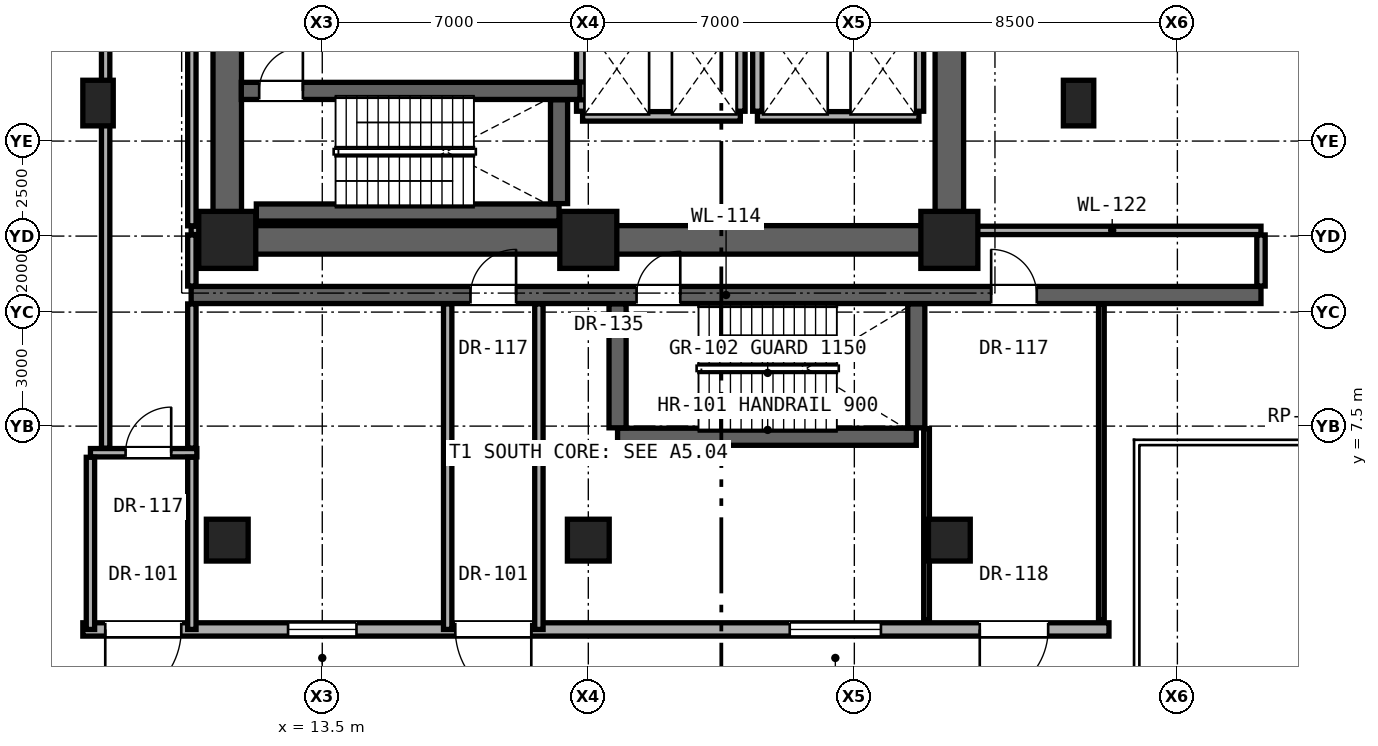
"""IFC4 building model, lengths in metres.
Left out: names, types, materials, properties, quantities, classifications, styles, units other than length and angle.
Written with IfcOpenShell. Run it as: python <this file> out.ifc"""

import sys

from ifc_helpers import new_model, si_unit, direction, frame, frame_2d, origin, origin_2d, place, context, subcontext, project, spatial, rectangle, extrude, element, fill, save


model = new_model("IFC4")
c1 = context("Model", 3, precision=1e-05, world=origin(), true_north=direction((0.0, 1.0)))
c2 = subcontext(c1, "Body", "Model", "MODEL_VIEW")
j1 = project(units=[si_unit("LENGTHUNIT", "METRE"), si_unit("PLANEANGLEUNIT", "RADIAN")], contexts=[c1])
p1 = place(None, origin())
s1 = spatial("IfcSite", under=j1, at=p1, CompositionType="ELEMENT")
p2 = place(p1, origin())
s2 = spatial("IfcBuilding", under=s1, at=p2, CompositionType="ELEMENT")
p3 = place(p2, origin())
s3 = spatial("IfcBuildingStorey", under=s2, at=p3, CompositionType="ELEMENT", Elevation=0.0)
for number, where, z_axis, x_axis in (
    (1, (11.0, 12.4, 0.0), (0.0, 0.0, 1.0), (1.0, 0.0, 0.0)),
    (2, (20.5, 12.4, 0.0), (0.0, 0.0, 1.0), (1.0, 0.0, 0.0)),
    (3, (30.0, 12.4, 0.0), (0.0, 0.0, 1.0), (1.0, 0.0, 0.0)),
):
    element("IfcColumn", number, at=place(p3, frame(where, z_axis=z_axis, x_axis=x_axis)), inside=s3, PredefinedType="COLUMN", context=c2, shape_type="SweptSolid", body=[
        extrude(rectangle(XDim=1.5, YDim=1.5, at=origin_2d()), origin(), (0.0, 0.0, 1.0), 5.2),
    ])
for number, where, z_axis, x_axis in (
    (4, (7.6, 16.0, 0.0), (0.0, 0.0, 1.0), (1.0, 0.0, 0.0)),
    (5, (33.4, 16.0, 0.0), (0.0, 0.0, 1.0), (1.0, 0.0, 0.0)),
):
    element("IfcColumn", number, at=place(p3, frame(where, z_axis=z_axis, x_axis=x_axis)), inside=s3, PredefinedType="PILASTER", context=c2, shape_type="SweptSolid", body=[
        extrude(rectangle(XDim=0.8, YDim=1.2, at=origin_2d()), origin(), (0.0, 0.0, 1.0), 5.2),
    ])
p4 = place(p3, frame((11.0, 12.4, 0.0), z_axis=(0.0, 0.0, 1.0), x_axis=(1.0, 0.0, 0.0)))
e6 = element("IfcWall", 6, at=p4, inside=s3, PredefinedType="SHEAR", context=c2, shape_type="SweptSolid", body=[
    extrude(rectangle(XDim=19.0, YDim=0.75, at=frame_2d((9.5, 0.0))), origin(), (0.0, 0.0, 1.0), 4.88),
])
for number, where, z_axis, x_axis in (
    (7, (11.0, 12.4, 0.0), (0.0, 0.0, 1.0), (0.0, 1.0, 0.0)),
    (8, (30.0, 12.4, 0.0), (0.0, 0.0, 1.0), (0.0, 1.0, 0.0)),
):
    element("IfcWall", number, at=place(p3, frame(where, z_axis=z_axis, x_axis=x_axis)), inside=s3, PredefinedType="SHEAR", context=c2, shape_type="SweptSolid", body=[
        extrude(rectangle(XDim=6.0, YDim=0.75, at=frame_2d((3.0, 0.0))), origin(), (0.0, 0.0, 1.0), 4.88),
    ])
for number, where, z_axis, x_axis in (
    (9, (11.0, 4.5, 0.0), (0.0, 0.0, 1.0), (1.0, 0.0, 0.0)),
    (10, (20.5, 4.5, 0.0), (0.0, 0.0, 1.0), (1.0, 0.0, 0.0)),
    (11, (30.0, 4.5, 0.0), (0.0, 0.0, 1.0), (1.0, 0.0, 0.0)),
):
    element("IfcColumn", number, at=place(p3, frame(where, z_axis=z_axis, x_axis=x_axis)), inside=s3, PredefinedType="COLUMN", context=c2, shape_type="SweptSolid", body=[
        extrude(rectangle(XDim=1.1, YDim=1.1, at=origin_2d()), origin(), (0.0, 0.0, 1.0), 5.2),
    ])
p5 = place(p3, frame((34.2, 2.15, 0.0), z_axis=(0.0, 0.0, 1.0), x_axis=(-1.0, 0.0, 0.0)))
e12 = element("IfcWall", 12, at=p5, inside=s3, PredefinedType="SOLIDWALL", context=c2, shape_type="SweptSolid", body=[
    extrude(rectangle(XDim=27.0, YDim=0.35, at=frame_2d((13.5, 0.0))), origin(), (0.0, 0.0, 1.0), 4.86),
])
p6 = place(p5, frame((6.0, 0.0, 0.85)))
e13 = element("IfcOpeningElement", 13, at=p6, cuts=e12, PredefinedType="OPENING", context=c2, shape_type="SweptSolid", body=[
    extrude(rectangle(XDim=2.4, YDim=2.6, at=frame_2d((1.2, 1.3))), frame((0.0, 0.185, 0.0), z_axis=(0.0, -1.0, 0.0), x_axis=(1.0, 0.0, 0.0)), (0.0, 0.0, 1.0), 0.37),
])
p7 = place(p5, frame((19.8, 0.0, 0.85)))
e14 = element("IfcOpeningElement", 14, at=p7, cuts=e12, PredefinedType="OPENING", context=c2, shape_type="SweptSolid", body=[
    extrude(rectangle(XDim=1.8, YDim=2.4, at=frame_2d((0.9, 1.2))), frame((0.0, 0.185, 0.0), z_axis=(0.0, -1.0, 0.0), x_axis=(1.0, 0.0, 0.0)), (0.0, 0.0, 1.0), 0.37),
])
p8 = place(p5, frame((1.6, 0.0, 0.0)))
e15 = element("IfcOpeningElement", 15, at=p8, cuts=e12, PredefinedType="OPENING", context=c2, shape_type="SweptSolid", body=[
    extrude(rectangle(XDim=1.8, YDim=2.5, at=frame_2d((0.9, 1.25))), frame((0.0, 0.185, 0.0), z_axis=(0.0, -1.0, 0.0), x_axis=(1.0, 0.0, 0.0)), (0.0, 0.0, 1.0), 0.37),
])
p9 = place(p5, frame((15.2, 0.0, 0.0)))
e16 = element("IfcOpeningElement", 16, at=p9, cuts=e12, PredefinedType="OPENING", context=c2, shape_type="SweptSolid", body=[
    extrude(rectangle(XDim=2.0, YDim=2.4, at=frame_2d((1.0, 1.2))), frame((0.0, 0.185, 0.0), z_axis=(0.0, -1.0, 0.0), x_axis=(1.0, 0.0, 0.0)), (0.0, 0.0, 1.0), 0.37),
])
p10 = place(p5, frame((24.41, 0.0, 0.0)))
e17 = element("IfcOpeningElement", 17, at=p10, cuts=e12, PredefinedType="OPENING", context=c2, shape_type="SweptSolid", body=[
    extrude(rectangle(XDim=2.0, YDim=2.4, at=frame_2d((1.0, 1.2))), frame((0.0, 0.185, 0.0), z_axis=(0.0, -1.0, 0.0), x_axis=(1.0, 0.0, 0.0)), (0.0, 0.0, 1.0), 0.37),
])
p11 = place(p3, frame((7.4, 6.8, 0.0), z_axis=(0.0, 0.0, 1.0), x_axis=(1.0, 0.0, 0.0)))
e18 = element("IfcWall", 18, at=p11, inside=s3, PredefinedType="SOLIDWALL", context=c2, shape_type="SweptSolid", body=[
    extrude(rectangle(XDim=2.8, YDim=0.22, at=frame_2d((1.4, 0.0))), origin(), (0.0, 0.0, 1.0), 4.88),
])
p12 = place(p11, frame((0.925, 0.0, 0.0)))
e19 = element("IfcOpeningElement", 19, at=p12, cuts=e18, PredefinedType="OPENING", context=c2, shape_type="SweptSolid", body=[
    extrude(rectangle(XDim=1.2, YDim=2.25, at=frame_2d((0.6, 1.125))), frame((0.0, 0.12, 0.0), z_axis=(0.0, -1.0, 0.0), x_axis=(1.0, 0.0, 0.0)), (0.0, 0.0, 1.0), 0.24),
])
p13 = place(p3, frame((21.27, 7.22, 0.0), z_axis=(0.0, 0.0, 1.0), x_axis=(1.0, 0.0, 0.0)))
e20 = element("IfcWall", 20, at=p13, inside=s3, PredefinedType="SHEAR", context=c2, shape_type="SweptSolid", body=[
    extrude(rectangle(XDim=7.86, YDim=0.45, at=frame_2d((3.93, 0.0))), origin(), (0.0, 0.0, 1.0), 4.88),
])
p14 = place(p3, frame((10.05, 10.95, 0.0), z_axis=(0.0, 0.0, 1.0), x_axis=(1.0, 0.0, 0.0)))
e21 = element("IfcWall", 21, at=p14, inside=s3, PredefinedType="SHEAR", context=c2, shape_type="SweptSolid", body=[
    extrude(rectangle(XDim=28.15, YDim=0.45, at=frame_2d((14.075, 0.0))), origin(), (0.0, 0.0, 1.0), 4.88),
])
p15 = place(p14, frame((7.35, 0.0, 0.0)))
e22 = element("IfcOpeningElement", 22, at=p15, cuts=e21, PredefinedType="OPENING", context=c2, shape_type="SweptSolid", body=[
    extrude(rectangle(XDim=1.2, YDim=2.25, at=frame_2d((0.6, 1.125))), frame((0.0, 0.235, 0.0), z_axis=(0.0, -1.0, 0.0), x_axis=(1.0, 0.0, 0.0)), (0.0, 0.0, 1.0), 0.47),
])
p16 = place(p14, frame((11.72, 0.0, 0.0)))
e23 = element("IfcOpeningElement", 23, at=p16, cuts=e21, PredefinedType="OPENING", context=c2, shape_type="SweptSolid", body=[
    extrude(rectangle(XDim=1.15, YDim=2.2, at=frame_2d((0.575, 1.1))), frame((0.0, 0.235, 0.0), z_axis=(0.0, -1.0, 0.0), x_axis=(1.0, 0.0, 0.0)), (0.0, 0.0, 1.0), 0.47),
])
p17 = place(p14, frame((21.05, 0.0, 0.0)))
e24 = element("IfcOpeningElement", 24, at=p17, cuts=e21, PredefinedType="OPENING", context=c2, shape_type="SweptSolid", body=[
    extrude(rectangle(XDim=1.2, YDim=2.25, at=frame_2d((0.6, 1.125))), frame((0.0, 0.235, 0.0), z_axis=(0.0, -1.0, 0.0), x_axis=(1.0, 0.0, 0.0)), (0.0, 0.0, 1.0), 0.47),
])
p18 = place(p3, frame((10.05, 12.65, 0.0), z_axis=(0.0, 0.0, 1.0), x_axis=(1.0, 0.0, 0.0)))
e25 = element("IfcWall", 25, at=p18, inside=s3, PredefinedType="SOLIDWALL", context=c2, shape_type="SweptSolid", body=[
    extrude(rectangle(XDim=0.58, YDim=0.22, at=frame_2d((0.29, 0.0))), origin(), (0.0, 0.0, 1.0), 4.88),
])
p19 = place(p3, frame((30.37, 12.65, 0.0), z_axis=(0.0, 0.0, 1.0), x_axis=(1.0, 0.0, 0.0)))
e26 = element("IfcWall", 26, at=p19, inside=s3, PredefinedType="SOLIDWALL", context=c2, shape_type="SweptSolid", body=[
    extrude(rectangle(XDim=7.83, YDim=0.22, at=frame_2d((3.915, 0.0))), origin(), (0.0, 0.0, 1.0), 3.924),
])
p20 = place(p3, frame((11.765, 13.12, 0.0), z_axis=(0.0, 0.0, 1.0), x_axis=(1.0, 0.0, 0.0)))
e27 = element("IfcWall", 27, at=p20, inside=s3, PredefinedType="SHEAR", context=c2, shape_type="SweptSolid", body=[
    extrude(rectangle(XDim=7.965, YDim=0.45, at=frame_2d((3.982, 0.0))), origin(), (0.0, 0.0, 1.0), 4.88),
])
p21 = place(p3, frame((20.35, 15.65, 0.0), z_axis=(0.0, 0.0, 1.0), x_axis=(1.0, 0.0, 0.0)))
e28 = element("IfcWall", 28, at=p21, inside=s3, PredefinedType="SOLIDWALL", context=c2, shape_type="SweptSolid", body=[
    extrude(rectangle(XDim=4.15, YDim=0.25, at=frame_2d((2.075, 0.0))), origin(), (0.0, 0.0, 1.0), 4.88),
])
p22 = place(p3, frame((24.95, 15.65, 0.0), z_axis=(0.0, 0.0, 1.0), x_axis=(1.0, 0.0, 0.0)))
e29 = element("IfcWall", 29, at=p22, inside=s3, PredefinedType="SOLIDWALL", context=c2, shape_type="SweptSolid", body=[
    extrude(rectangle(XDim=4.25, YDim=0.25, at=frame_2d((2.125, 0.0))), origin(), (0.0, 0.0, 1.0), 4.88),
])
p23 = place(p3, frame((11.37, 16.32, 0.0), z_axis=(0.0, 0.0, 1.0), x_axis=(1.0, 0.0, 0.0)))
e30 = element("IfcWall", 30, at=p23, inside=s3, PredefinedType="SHEAR", context=c2, shape_type="SweptSolid", body=[
    extrude(rectangle(XDim=8.91, YDim=0.45, at=frame_2d((4.455, 0.0))), origin(), (0.0, 0.0, 1.0), 4.88),
])
p24 = place(p23, frame((0.47, 0.0, 0.0)))
e31 = element("IfcOpeningElement", 31, at=p24, cuts=e30, PredefinedType="OPENING", context=c2, shape_type="SweptSolid", body=[
    extrude(rectangle(XDim=1.15, YDim=2.2, at=frame_2d((0.575, 1.1))), frame((0.0, 0.235, 0.0), z_axis=(0.0, -1.0, 0.0), x_axis=(1.0, 0.0, 0.0)), (0.0, 0.0, 1.0), 0.47),
])
p25 = place(p3, frame((7.4, 2.15, 0.0), z_axis=(0.0, 0.0, 1.0), x_axis=(0.0, 1.0, 0.0)))
e32 = element("IfcWall", 32, at=p25, inside=s3, PredefinedType="SOLIDWALL", context=c2, shape_type="SweptSolid", body=[
    extrude(rectangle(XDim=4.53, YDim=0.22, at=frame_2d((2.265, 0.0))), origin(), (0.0, 0.0, 1.0), 4.88),
])
p26 = place(p3, frame((7.8, 6.92, 0.0), z_axis=(0.0, 0.0, 1.0), x_axis=(0.0, 1.0, 0.0)))
e33 = element("IfcWall", 33, at=p26, inside=s3, PredefinedType="SOLIDWALL", context=c2, shape_type="SweptSolid", body=[
    extrude(rectangle(XDim=39.98, YDim=0.22, at=frame_2d((19.99, 0.0))), origin(), (0.0, 0.0, 1.0), 3.772),
])
p27 = place(p3, frame((10.069, 2.15, 0.0), z_axis=(0.0, 0.0, 1.0), x_axis=(0.0, 1.0, 0.0)))
e34 = element("IfcWall", 34, at=p27, inside=s3, PredefinedType="SOLIDWALL", context=c2, shape_type="SweptSolid", body=[
    extrude(rectangle(XDim=4.53, YDim=0.22, at=frame_2d((2.265, 0.0))), origin(), (0.0, 0.0, 1.0), 4.88),
])
p28 = place(p3, frame((10.069, 6.92, 0.0), z_axis=(0.0, 0.0, 1.0), x_axis=(0.0, 1.0, 0.0)))
e35 = element("IfcWall", 35, at=p28, inside=s3, PredefinedType="SOLIDWALL", context=c2, shape_type="SweptSolid", body=[
    extrude(rectangle(XDim=3.795, YDim=0.22, at=frame_2d((1.897, 0.0))), origin(), (0.0, 0.0, 1.0), 4.88),
])
p29 = place(p3, frame((10.069, 11.185, 0.0), z_axis=(0.0, 0.0, 1.0), x_axis=(0.0, 1.0, 0.0)))
e36 = element("IfcWall", 36, at=p29, inside=s3, PredefinedType="SOLIDWALL", context=c2, shape_type="SweptSolid", body=[
    extrude(rectangle(XDim=1.345, YDim=0.22, at=frame_2d((0.672, 0.0))), origin(), (0.0, 0.0, 1.0), 4.88),
])
p30 = place(p3, frame((10.069, 12.77, 0.0), z_axis=(0.0, 0.0, 1.0), x_axis=(0.0, 1.0, 0.0)))
e37 = element("IfcWall", 37, at=p30, inside=s3, PredefinedType="SOLIDWALL", context=c2, shape_type="SweptSolid", body=[
    extrude(rectangle(XDim=5.51, YDim=0.22, at=frame_2d((2.755, 0.0))), origin(), (0.0, 0.0, 1.0), 3.772),
])
for number, where, z_axis, x_axis in (
    (38, (16.8, 2.15, 0.0), (0.0, 0.0, 1.0), (0.0, 1.0, 0.0)),
    (39, (19.2, 2.15, 0.0), (0.0, 0.0, 1.0), (0.0, 1.0, 0.0)),
):
    element("IfcWall", number, at=place(p3, frame(where, z_axis=z_axis, x_axis=x_axis)), inside=s3, PredefinedType="SOLIDWALL", context=c2, shape_type="SweptSolid", body=[
        extrude(rectangle(XDim=8.565, YDim=0.22, at=frame_2d((4.283, 0.0))), origin(), (0.0, 0.0, 1.0), 4.099),
    ])
p31 = place(p3, frame((19.73, 13.355, 0.0), z_axis=(0.0, 0.0, 1.0), x_axis=(0.0, 1.0, 0.0)))
e40 = element("IfcWall", 40, at=p31, inside=s3, PredefinedType="SHEAR", context=c2, shape_type="SweptSolid", body=[
    extrude(rectangle(XDim=2.73, YDim=0.45, at=frame_2d((1.365, 0.0))), origin(), (0.0, 0.0, 1.0), 4.88),
])
p32 = place(p3, frame((20.315, 15.785, 0.0), z_axis=(0.0, 0.0, 1.0), x_axis=(0.0, 1.0, 0.0)))
e41 = element("IfcWall", 41, at=p32, inside=s3, PredefinedType="SOLIDWALL", context=c2, shape_type="SweptSolid", body=[
    extrude(rectangle(XDim=0.3, YDim=0.25, at=frame_2d((0.15, 0.0))), origin(), (0.0, 0.0, 1.0), 4.88),
])
p33 = place(p3, frame((20.315, 16.555, 0.0), z_axis=(0.0, 0.0, 1.0), x_axis=(0.0, 1.0, 0.0)))
e42 = element("IfcWall", 42, at=p33, inside=s3, PredefinedType="SOLIDWALL", context=c2, shape_type="SweptSolid", body=[
    extrude(rectangle(XDim=1.475, YDim=0.25, at=frame_2d((0.738, 0.0))), origin(), (0.0, 0.0, 1.0), 4.88),
])
p34 = place(p3, frame((21.27, 7.455, 0.0), z_axis=(0.0, 0.0, 1.0), x_axis=(0.0, 1.0, 0.0)))
e43 = element("IfcWall", 43, at=p34, inside=s3, PredefinedType="SHEAR", context=c2, shape_type="SweptSolid", body=[
    extrude(rectangle(XDim=3.26, YDim=0.45, at=frame_2d((1.63, 0.0))), origin(), (0.0, 0.0, 1.0), 4.88),
])
for number, where, z_axis, x_axis in (
    (44, (24.5, 15.785, 0.0), (0.0, 0.0, 1.0), (0.0, 1.0, 0.0)),
    (45, (24.95, 15.785, 0.0), (0.0, 0.0, 1.0), (0.0, 1.0, 0.0)),
):
    element("IfcWall", number, at=place(p3, frame(where, z_axis=z_axis, x_axis=x_axis)), inside=s3, PredefinedType="SOLIDWALL", context=c2, shape_type="SweptSolid", body=[
        extrude(rectangle(XDim=2.245, YDim=0.25, at=frame_2d((1.123, 0.0))), origin(), (0.0, 0.0, 1.0), 4.88),
    ])
p35 = place(p3, frame((29.13, 7.455, 0.0), z_axis=(0.0, 0.0, 1.0), x_axis=(0.0, 1.0, 0.0)))
e46 = element("IfcWall", 46, at=p35, inside=s3, PredefinedType="SHEAR", context=c2, shape_type="SweptSolid", body=[
    extrude(rectangle(XDim=3.26, YDim=0.45, at=frame_2d((1.63, 0.0))), origin(), (0.0, 0.0, 1.0), 4.88),
])
p36 = place(p3, frame((29.2, 15.785, 0.0), z_axis=(0.0, 0.0, 1.0), x_axis=(0.0, 1.0, 0.0)))
e47 = element("IfcWall", 47, at=p36, inside=s3, PredefinedType="SOLIDWALL", context=c2, shape_type="SweptSolid", body=[
    extrude(rectangle(XDim=2.245, YDim=0.25, at=frame_2d((1.123, 0.0))), origin(), (0.0, 0.0, 1.0), 4.88),
])
p37 = place(p3, frame((29.4, 2.4, 0.0), z_axis=(0.0, 0.0, 1.0), x_axis=(0.0, 1.0, 0.0)))
e48 = element("IfcWall", 48, at=p37, inside=s3, PredefinedType="PARTITIONING", context=c2, shape_type="SweptSolid", body=[
    extrude(rectangle(XDim=5.035, YDim=0.15, at=frame_2d((2.518, 0.0))), origin(), (0.0, 0.0, 1.0), 4.099),
])
p38 = place(p3, frame((34.0, 2.4, 0.0), z_axis=(0.0, 0.0, 1.0), x_axis=(0.0, 1.0, 0.0)))
e49 = element("IfcWall", 49, at=p38, inside=s3, PredefinedType="PARTITIONING", context=c2, shape_type="SweptSolid", body=[
    extrude(rectangle(XDim=8.315, YDim=0.15, at=frame_2d((4.158, 0.0))), origin(), (0.0, 0.0, 1.0), 4.099),
])
p39 = place(p3, frame((38.2, 11.185, 0.0), z_axis=(0.0, 0.0, 1.0), x_axis=(0.0, 1.0, 0.0)))
e50 = element("IfcWall", 50, at=p39, inside=s3, PredefinedType="SOLIDWALL", context=c2, shape_type="SweptSolid", body=[
    extrude(rectangle(XDim=1.345, YDim=0.22, at=frame_2d((0.672, 0.0))), origin(), (0.0, 0.0, 1.0), 3.924),
])
p40 = place(p6, origin())
e51 = element("IfcWindow", 51, at=p40, inside=s3, PartitioningType="SINGLE_PANEL", PredefinedType="WINDOW", context=c2, shape_type="SweptSolid", body=[
    extrude(rectangle(XDim=2.4, YDim=2.6, at=frame_2d((1.2, 1.3))), frame((0.0, 0.03, 0.0), z_axis=(0.0, -1.0, 0.0), x_axis=(1.0, 0.0, 0.0)), (0.0, 0.0, 1.0), 0.06),
])
fill(e13, e51)
p41 = place(p7, origin())
e52 = element("IfcWindow", 52, at=p41, inside=s3, PartitioningType="SINGLE_PANEL", PredefinedType="WINDOW", context=c2, shape_type="SweptSolid", body=[
    extrude(rectangle(XDim=1.8, YDim=2.4, at=frame_2d((0.9, 1.2))), frame((0.0, 0.03, 0.0), z_axis=(0.0, -1.0, 0.0), x_axis=(1.0, 0.0, 0.0)), (0.0, 0.0, 1.0), 0.06),
])
fill(e14, e52)
p42 = place(p8, origin())
e53 = element("IfcDoor", 53, at=p42, inside=s3, OperationType="SINGLE_SWING_RIGHT", PredefinedType="DOOR", context=c2, shape_type="SweptSolid", body=[
    extrude(rectangle(XDim=1.8, YDim=2.5, at=frame_2d((0.9, 1.25))), frame((0.0, 0.025, 0.0), z_axis=(0.0, -1.0, 0.0), x_axis=(1.0, 0.0, 0.0)), (0.0, 0.0, 1.0), 0.05),
])
fill(e15, e53)
p43 = place(p9, origin())
e54 = element("IfcDoor", 54, at=p43, inside=s3, OperationType="SINGLE_SWING_LEFT", PredefinedType="DOOR", context=c2, shape_type="SweptSolid", body=[
    extrude(rectangle(XDim=2.0, YDim=2.4, at=frame_2d((1.0, 1.2))), frame((0.0, 0.025, 0.0), z_axis=(0.0, -1.0, 0.0), x_axis=(1.0, 0.0, 0.0)), (0.0, 0.0, 1.0), 0.05),
])
fill(e16, e54)
p44 = place(p10, origin())
e55 = element("IfcDoor", 55, at=p44, inside=s3, OperationType="SINGLE_SWING_RIGHT", PredefinedType="DOOR", context=c2, shape_type="SweptSolid", body=[
    extrude(rectangle(XDim=2.0, YDim=2.4, at=frame_2d((1.0, 1.2))), frame((0.0, 0.025, 0.0), z_axis=(0.0, -1.0, 0.0), x_axis=(1.0, 0.0, 0.0)), (0.0, 0.0, 1.0), 0.05),
])
fill(e17, e55)
p45 = place(p12, origin())
e56 = element("IfcDoor", 56, at=p45, inside=s3, OperationType="SINGLE_SWING_RIGHT", PredefinedType="DOOR", context=c2, shape_type="SweptSolid", body=[
    extrude(rectangle(XDim=1.2, YDim=2.25, at=frame_2d((0.6, 1.125))), frame((0.0, 0.025, 0.0), z_axis=(0.0, -1.0, 0.0), x_axis=(1.0, 0.0, 0.0)), (0.0, 0.0, 1.0), 0.05),
])
fill(e19, e56)
p46 = place(p24, origin())
e57 = element("IfcDoor", 57, at=p46, inside=s3, OperationType="SINGLE_SWING_RIGHT", PredefinedType="DOOR", context=c2, shape_type="SweptSolid", body=[
    extrude(rectangle(XDim=1.15, YDim=2.2, at=frame_2d((0.575, 1.1))), frame((0.0, 0.025, 0.0), z_axis=(0.0, -1.0, 0.0), x_axis=(1.0, 0.0, 0.0)), (0.0, 0.0, 1.0), 0.05),
])
fill(e31, e57)
p47 = place(p15, origin())
e58 = element("IfcDoor", 58, at=p47, inside=s3, OperationType="SINGLE_SWING_RIGHT", PredefinedType="DOOR", context=c2, shape_type="SweptSolid", body=[
    extrude(rectangle(XDim=1.2, YDim=2.25, at=frame_2d((0.6, 1.125))), frame((0.0, 0.025, 0.0), z_axis=(0.0, -1.0, 0.0), x_axis=(1.0, 0.0, 0.0)), (0.0, 0.0, 1.0), 0.05),
])
fill(e22, e58)
p48 = place(p16, origin())
e59 = element("IfcDoor", 59, at=p48, inside=s3, OperationType="SINGLE_SWING_RIGHT", PredefinedType="DOOR", context=c2, shape_type="SweptSolid", body=[
    extrude(rectangle(XDim=1.15, YDim=2.2, at=frame_2d((0.575, 1.1))), frame((0.0, 0.025, 0.0), z_axis=(0.0, -1.0, 0.0), x_axis=(1.0, 0.0, 0.0)), (0.0, 0.0, 1.0), 0.05),
])
fill(e23, e59)
p49 = place(p17, origin())
e60 = element("IfcDoor", 60, at=p49, inside=s3, OperationType="SINGLE_SWING_LEFT", PredefinedType="DOOR", context=c2, shape_type="SweptSolid", body=[
    extrude(rectangle(XDim=1.2, YDim=2.25, at=frame_2d((0.6, 1.125))), frame((0.0, 0.025, 0.0), z_axis=(0.0, -1.0, 0.0), x_axis=(1.0, 0.0, 0.0)), (0.0, 0.0, 1.0), 0.05),
])
fill(e24, e60)
save(model, sys.argv[1])
